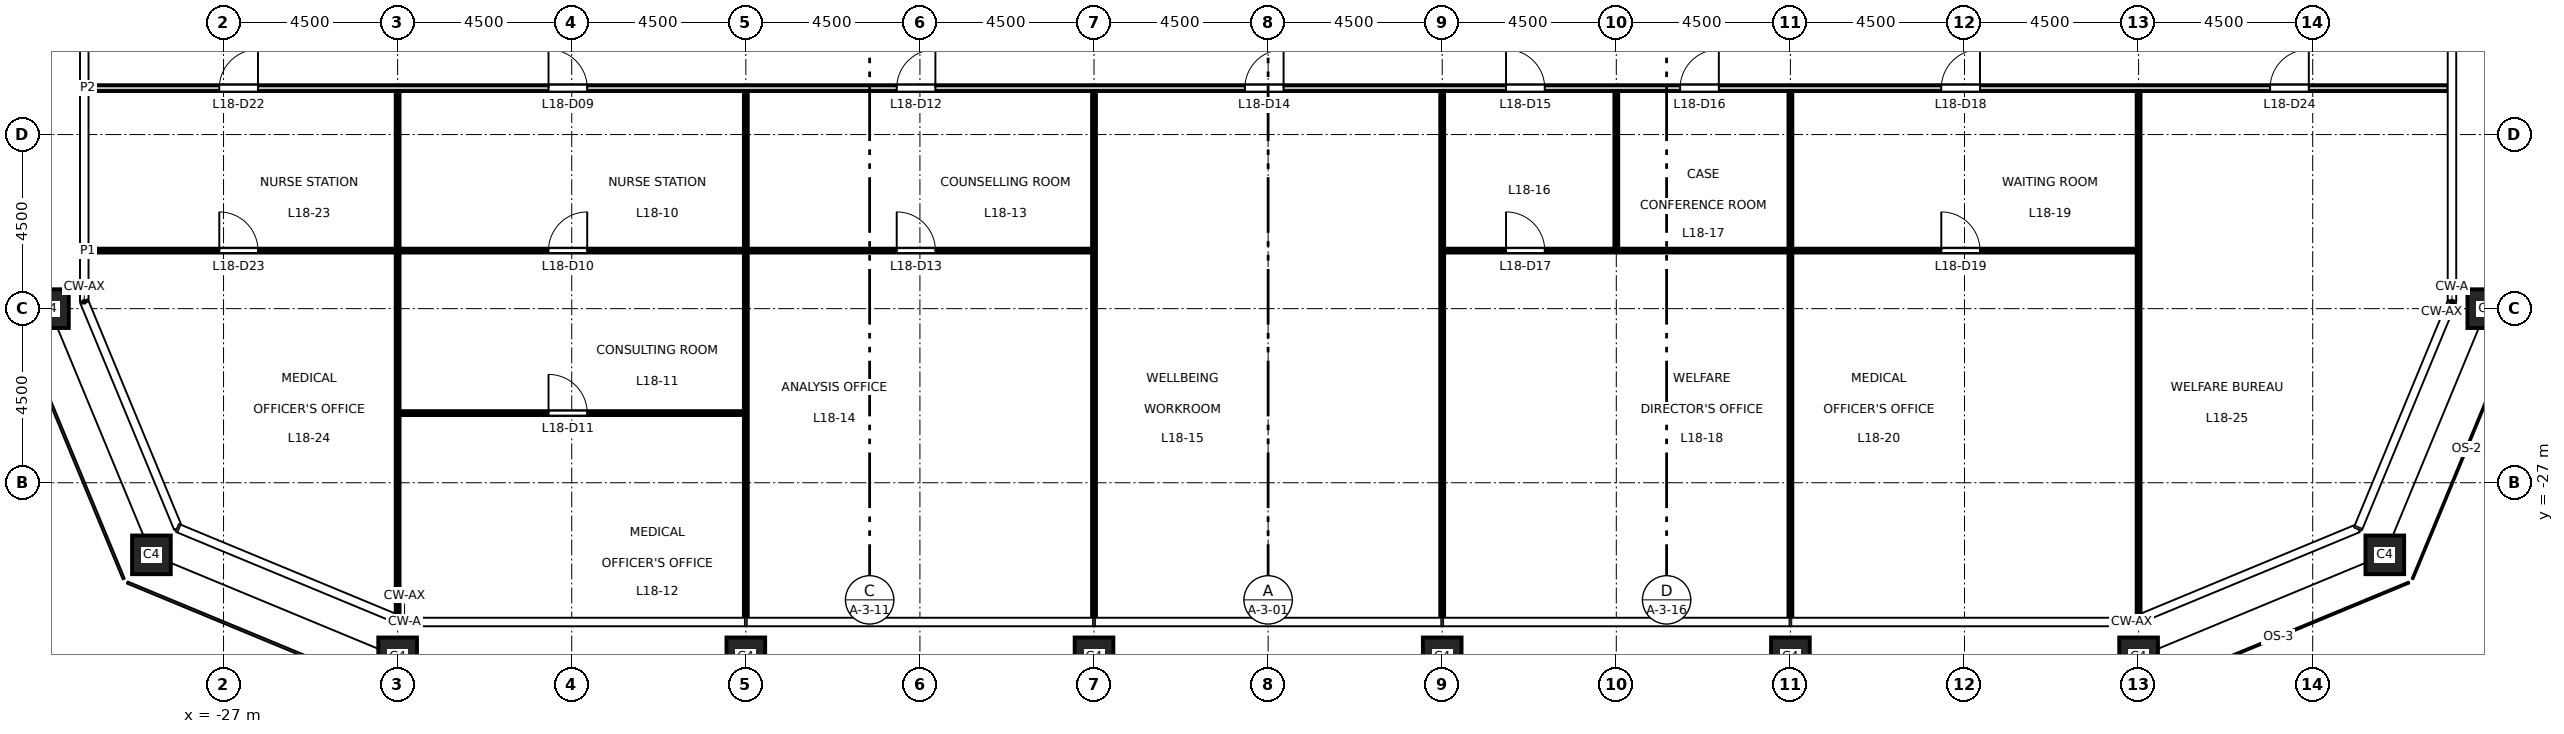
"""IFC4 building model, lengths in metres.
Left out: names, types, materials, properties, quantities, classifications, styles, units other than length and angle.
Written with IfcOpenShell. Run it as: python <this file> out.ifc"""

import sys

from ifc_helpers import new_model, si_unit, direction, frame, frame_2d, origin, origin_2d, place, context, subcontext, project, spatial, rectangle, hollow_rectangle, extrude, element, fill, save


model = new_model("IFC4")
c1 = context("Model", 3, precision=1e-05, world=origin(), true_north=direction((0.0, 1.0)))
c2 = subcontext(c1, "Body", "Model", "MODEL_VIEW")
j1 = project(units=[si_unit("LENGTHUNIT", "METRE"), si_unit("PLANEANGLEUNIT", "RADIAN")], contexts=[c1])
p1 = place(None, origin())
s1 = spatial("IfcSite", under=j1, at=p1, CompositionType="ELEMENT")
p2 = place(p1, origin())
s2 = spatial("IfcBuilding", under=s1, at=p2, CompositionType="ELEMENT")
p3 = place(p2, frame((0.0, 0.0, 85.2)))
s3 = spatial("IfcBuildingStorey", under=s2, at=p3, CompositionType="ELEMENT", Elevation=85.2)
for number, where, z_axis, x_axis in (
    (1, (-22.5, -31.5, 0.0), (0.0, 0.0, 1.0), (1.0, 0.0, 0.0)),
    (2, (-13.5, -31.5, 0.0), (0.0, 0.0, 1.0), (1.0, 0.0, 0.0)),
    (3, (-4.5, -31.5, 0.0), (0.0, 0.0, 1.0), (1.0, 0.0, 0.0)),
    (4, (4.5, -31.5, 0.0), (0.0, 0.0, 1.0), (1.0, 0.0, 0.0)),
    (5, (13.5, -31.5, 0.0), (0.0, 0.0, 1.0), (1.0, 0.0, 0.0)),
    (6, (22.5, -31.5, 0.0), (0.0, 0.0, 1.0), (1.0, 0.0, 0.0)),
    (7, (28.864, -28.864, 0.0), (0.0, 0.0, 1.0), (1.0, 0.0, 0.0)),
    (8, (31.5, -22.5, 0.0), (0.0, 0.0, 1.0), (1.0, 0.0, 0.0)),
    (9, (-31.5, -22.5, 0.0), (0.0, 0.0, 1.0), (1.0, 0.0, 0.0)),
    (10, (-28.864, -28.864, 0.0), (0.0, 0.0, 1.0), (1.0, 0.0, 0.0)),
):
    element("IfcColumn", number, at=place(p3, frame(where, z_axis=z_axis, x_axis=x_axis)), inside=s3, PredefinedType="COLUMN", context=c2, shape_type="SweptSolid", body=[
        extrude(hollow_rectangle(XDim=1.0, YDim=1.0, WallThickness=0.06, at=origin_2d()), origin(), (0.0, 0.0, 1.0), 4.5),
    ])
p4 = place(p3, frame((-22.45, -25.2, 0.0), z_axis=(0.0, 0.0, 1.0), x_axis=(1.0, 0.0, 0.0)))
e11 = element("IfcWall", 11, at=p4, inside=s3, PredefinedType="PARTITIONING", context=c2, shape_type="SweptSolid", body=[
    extrude(rectangle(XDim=8.9, YDim=0.1, at=frame_2d((4.45, 0.0))), origin(), (0.0, 0.0, 1.0), 4.35),
])
p5 = place(p4, frame((3.85, 0.0, 0.0)))
e12 = element("IfcOpeningElement", 12, at=p5, cuts=e11, PredefinedType="OPENING", context=c2, shape_type="SweptSolid", body=[
    extrude(rectangle(XDim=1.0, YDim=2.1, at=frame_2d((0.5, 1.05))), frame((0.0, 0.06, 0.0), z_axis=(0.0, -1.0, 0.0), x_axis=(1.0, 0.0, 0.0)), (0.0, 0.0, 1.0), 0.12),
])
p6 = place(p3, frame((-30.51, -21.0, 0.0), z_axis=(0.0, 0.0, 1.0), x_axis=(1.0, 0.0, 0.0)))
e13 = element("IfcWall", 13, at=p6, inside=s3, PredefinedType="PARTITIONING", context=c2, shape_type="SweptSolid", body=[
    extrude(rectangle(XDim=25.96, YDim=0.1, at=frame_2d((12.98, 0.0))), origin(), (0.0, 0.0, 1.0), 4.35),
])
p7 = place(p6, frame((11.91, 0.0, 0.0)))
e14 = element("IfcOpeningElement", 14, at=p7, cuts=e13, PredefinedType="OPENING", context=c2, shape_type="SweptSolid", body=[
    extrude(rectangle(XDim=1.0, YDim=2.1, at=frame_2d((0.5, 1.05))), frame((0.0, 0.06, 0.0), z_axis=(0.0, -1.0, 0.0), x_axis=(1.0, 0.0, 0.0)), (0.0, 0.0, 1.0), 0.12),
])
p8 = place(p6, frame((20.91, 0.0, 0.0)))
e15 = element("IfcOpeningElement", 15, at=p8, cuts=e13, PredefinedType="OPENING", context=c2, shape_type="SweptSolid", body=[
    extrude(rectangle(XDim=1.0, YDim=2.1, at=frame_2d((0.5, 1.05))), frame((0.0, 0.06, 0.0), z_axis=(0.0, -1.0, 0.0), x_axis=(1.0, 0.0, 0.0)), (0.0, 0.0, 1.0), 0.12),
])
p9 = place(p6, frame((3.4, 0.0, 0.0)))
e16 = element("IfcOpeningElement", 16, at=p9, cuts=e13, PredefinedType="OPENING", context=c2, shape_type="SweptSolid", body=[
    extrude(rectangle(XDim=1.0, YDim=2.1, at=frame_2d((0.5, 1.05))), frame((0.0, 0.06, 0.0), z_axis=(0.0, -1.0, 0.0), x_axis=(1.0, 0.0, 0.0)), (0.0, 0.0, 1.0), 0.12),
])
p10 = place(p3, frame((4.55, -21.0, 0.0), z_axis=(0.0, 0.0, 1.0), x_axis=(1.0, 0.0, 0.0)))
e17 = element("IfcWall", 17, at=p10, inside=s3, PredefinedType="PARTITIONING", context=c2, shape_type="SweptSolid", body=[
    extrude(rectangle(XDim=17.9, YDim=0.1, at=frame_2d((8.95, 0.0))), origin(), (0.0, 0.0, 1.0), 4.35),
])
p11 = place(p10, frame((1.6, 0.0, 0.0)))
e18 = element("IfcOpeningElement", 18, at=p11, cuts=e17, PredefinedType="OPENING", context=c2, shape_type="SweptSolid", body=[
    extrude(rectangle(XDim=1.0, YDim=2.1, at=frame_2d((0.5, 1.05))), frame((0.0, 0.06, 0.0), z_axis=(0.0, -1.0, 0.0), x_axis=(1.0, 0.0, 0.0)), (0.0, 0.0, 1.0), 0.12),
])
p12 = place(p10, frame((12.85, 0.0, 0.0)))
e19 = element("IfcOpeningElement", 19, at=p12, cuts=e17, PredefinedType="OPENING", context=c2, shape_type="SweptSolid", body=[
    extrude(rectangle(XDim=1.0, YDim=2.1, at=frame_2d((0.5, 1.05))), frame((0.0, 0.06, 0.0), z_axis=(0.0, -1.0, 0.0), x_axis=(1.0, 0.0, 0.0)), (0.0, 0.0, 1.0), 0.12),
])
p13 = place(p3, frame((-30.51, -16.8, 0.0), z_axis=(0.0, 0.0, 1.0), x_axis=(1.0, 0.0, 0.0)))
e20 = element("IfcWall", 20, at=p13, inside=s3, PredefinedType="PARTITIONING", context=c2, shape_type="SweptSolid", body=[
    extrude(rectangle(XDim=61.02, YDim=0.15, at=frame_2d((30.51, 0.0))), origin(), (0.0, 0.0, 1.0), 4.35),
])
p14 = place(p13, frame((11.91, 0.0, 0.0)))
e21 = element("IfcOpeningElement", 21, at=p14, cuts=e20, PredefinedType="OPENING", context=c2, shape_type="SweptSolid", body=[
    extrude(rectangle(XDim=1.0, YDim=2.1, at=frame_2d((0.5, 1.05))), frame((0.0, 0.085, 0.0), z_axis=(0.0, -1.0, 0.0), x_axis=(1.0, 0.0, 0.0)), (0.0, 0.0, 1.0), 0.17),
])
p15 = place(p13, frame((20.91, 0.0, 0.0)))
e22 = element("IfcOpeningElement", 22, at=p15, cuts=e20, PredefinedType="OPENING", context=c2, shape_type="SweptSolid", body=[
    extrude(rectangle(XDim=1.0, YDim=2.1, at=frame_2d((0.5, 1.05))), frame((0.0, 0.085, 0.0), z_axis=(0.0, -1.0, 0.0), x_axis=(1.0, 0.0, 0.0)), (0.0, 0.0, 1.0), 0.17),
])
p16 = place(p13, frame((29.91, 0.0, 0.0)))
e23 = element("IfcOpeningElement", 23, at=p16, cuts=e20, PredefinedType="OPENING", context=c2, shape_type="SweptSolid", body=[
    extrude(rectangle(XDim=1.0, YDim=2.1, at=frame_2d((0.5, 1.05))), frame((0.0, 0.085, 0.0), z_axis=(0.0, -1.0, 0.0), x_axis=(1.0, 0.0, 0.0)), (0.0, 0.0, 1.0), 0.17),
])
p17 = place(p13, frame((36.66, 0.0, 0.0)))
e24 = element("IfcOpeningElement", 24, at=p17, cuts=e20, PredefinedType="OPENING", context=c2, shape_type="SweptSolid", body=[
    extrude(rectangle(XDim=1.0, YDim=2.1, at=frame_2d((0.5, 1.05))), frame((0.0, 0.085, 0.0), z_axis=(0.0, -1.0, 0.0), x_axis=(1.0, 0.0, 0.0)), (0.0, 0.0, 1.0), 0.17),
])
p18 = place(p13, frame((41.16, 0.0, 0.0)))
e25 = element("IfcOpeningElement", 25, at=p18, cuts=e20, PredefinedType="OPENING", context=c2, shape_type="SweptSolid", body=[
    extrude(rectangle(XDim=1.0, YDim=2.1, at=frame_2d((0.5, 1.05))), frame((0.0, 0.085, 0.0), z_axis=(0.0, -1.0, 0.0), x_axis=(1.0, 0.0, 0.0)), (0.0, 0.0, 1.0), 0.17),
])
p19 = place(p13, frame((47.91, 0.0, 0.0)))
e26 = element("IfcOpeningElement", 26, at=p19, cuts=e20, PredefinedType="OPENING", context=c2, shape_type="SweptSolid", body=[
    extrude(rectangle(XDim=1.0, YDim=2.1, at=frame_2d((0.5, 1.05))), frame((0.0, 0.085, 0.0), z_axis=(0.0, -1.0, 0.0), x_axis=(1.0, 0.0, 0.0)), (0.0, 0.0, 1.0), 0.17),
])
p20 = place(p13, frame((3.4, 0.0, 0.0)))
e27 = element("IfcOpeningElement", 27, at=p20, cuts=e20, PredefinedType="OPENING", context=c2, shape_type="SweptSolid", body=[
    extrude(rectangle(XDim=1.0, YDim=2.1, at=frame_2d((0.5, 1.05))), frame((0.0, 0.085, 0.0), z_axis=(0.0, -1.0, 0.0), x_axis=(1.0, 0.0, 0.0)), (0.0, 0.0, 1.0), 0.17),
])
p21 = place(p13, frame((56.41, 0.0, 0.0)))
e28 = element("IfcOpeningElement", 28, at=p21, cuts=e20, PredefinedType="OPENING", context=c2, shape_type="SweptSolid", body=[
    extrude(rectangle(XDim=1.0, YDim=2.1, at=frame_2d((0.5, 1.05))), frame((0.0, 0.085, 0.0), z_axis=(0.0, -1.0, 0.0), x_axis=(1.0, 0.0, 0.0)), (0.0, 0.0, 1.0), 0.17),
])
p22 = place(p3, frame((-22.5, -30.428, 0.0), z_axis=(0.0, 0.0, 1.0), x_axis=(0.0, 1.0, 0.0)))
e29 = element("IfcWall", 29, at=p22, inside=s3, PredefinedType="PARTITIONING", context=c2, shape_type="SweptSolid", body=[
    extrude(rectangle(XDim=9.378, YDim=0.1, at=frame_2d((4.689, 0.0))), origin(), (0.0, 0.0, 1.0), 3.35),
])
p23 = place(p3, frame((-22.5, -20.95, 0.0), z_axis=(0.0, 0.0, 1.0), x_axis=(0.0, 1.0, 0.0)))
e30 = element("IfcWall", 30, at=p23, inside=s3, PredefinedType="PARTITIONING", context=c2, shape_type="SweptSolid", body=[
    extrude(rectangle(XDim=4.075, YDim=0.1, at=frame_2d((2.038, 0.0))), origin(), (0.0, 0.0, 1.0), 3.35),
])
p24 = place(p3, frame((-13.5, -30.51, 0.0), z_axis=(0.0, 0.0, 1.0), x_axis=(0.0, 1.0, 0.0)))
e31 = element("IfcWall", 31, at=p24, inside=s3, PredefinedType="PARTITIONING", context=c2, shape_type="SweptSolid", body=[
    extrude(rectangle(XDim=9.46, YDim=0.1, at=frame_2d((4.73, 0.0))), origin(), (0.0, 0.0, 1.0), 3.35),
])
p25 = place(p3, frame((-13.5, -20.95, 0.0), z_axis=(0.0, 0.0, 1.0), x_axis=(0.0, 1.0, 0.0)))
e32 = element("IfcWall", 32, at=p25, inside=s3, PredefinedType="PARTITIONING", context=c2, shape_type="SweptSolid", body=[
    extrude(rectangle(XDim=4.075, YDim=0.1, at=frame_2d((2.038, 0.0))), origin(), (0.0, 0.0, 1.0), 3.35),
])
for number, where, z_axis, x_axis in (
    (33, (-4.5, -30.51, 0.0), (0.0, 0.0, 1.0), (0.0, 1.0, 0.0)),
    (34, (4.5, -30.51, 0.0), (0.0, 0.0, 1.0), (0.0, 1.0, 0.0)),
):
    element("IfcWall", number, at=place(p3, frame(where, z_axis=z_axis, x_axis=x_axis)), inside=s3, PredefinedType="PARTITIONING", context=c2, shape_type="SweptSolid", body=[
        extrude(rectangle(XDim=13.635, YDim=0.1, at=frame_2d((6.817, 0.0))), origin(), (0.0, 0.0, 1.0), 3.35),
    ])
p26 = place(p3, frame((9.0, -20.95, 0.0), z_axis=(0.0, 0.0, 1.0), x_axis=(0.0, 1.0, 0.0)))
e35 = element("IfcWall", 35, at=p26, inside=s3, PredefinedType="PARTITIONING", context=c2, shape_type="SweptSolid", body=[
    extrude(rectangle(XDim=4.075, YDim=0.1, at=frame_2d((2.038, 0.0))), origin(), (0.0, 0.0, 1.0), 4.35),
])
p27 = place(p3, frame((13.5, -30.51, 0.0), z_axis=(0.0, 0.0, 1.0), x_axis=(0.0, 1.0, 0.0)))
e36 = element("IfcWall", 36, at=p27, inside=s3, PredefinedType="PARTITIONING", context=c2, shape_type="SweptSolid", body=[
    extrude(rectangle(XDim=9.46, YDim=0.1, at=frame_2d((4.73, 0.0))), origin(), (0.0, 0.0, 1.0), 3.35),
])
p28 = place(p3, frame((13.5, -20.95, 0.0), z_axis=(0.0, 0.0, 1.0), x_axis=(0.0, 1.0, 0.0)))
e37 = element("IfcWall", 37, at=p28, inside=s3, PredefinedType="PARTITIONING", context=c2, shape_type="SweptSolid", body=[
    extrude(rectangle(XDim=4.075, YDim=0.1, at=frame_2d((2.038, 0.0))), origin(), (0.0, 0.0, 1.0), 3.35),
])
p29 = place(p3, frame((22.5, -30.428, 0.0), z_axis=(0.0, 0.0, 1.0), x_axis=(0.0, 1.0, 0.0)))
e38 = element("IfcWall", 38, at=p29, inside=s3, PredefinedType="PARTITIONING", context=c2, shape_type="SweptSolid", body=[
    extrude(rectangle(XDim=13.553, YDim=0.1, at=frame_2d((6.776, 0.0))), origin(), (0.0, 0.0, 1.0), 3.35),
])
p30 = place(p14, origin())
e39 = element("IfcDoor", 39, at=p30, inside=s3, OperationType="SINGLE_SWING_LEFT", PredefinedType="DOOR", context=c2, shape_type="SweptSolid", body=[
    extrude(rectangle(XDim=1.0, YDim=2.1, at=frame_2d((0.5, 1.05))), frame((0.0, 0.025, 0.0), z_axis=(0.0, -1.0, 0.0), x_axis=(1.0, 0.0, 0.0)), (0.0, 0.0, 1.0), 0.05),
])
fill(e21, e39)
p31 = place(p7, origin())
e40 = element("IfcDoor", 40, at=p31, inside=s3, OperationType="SINGLE_SWING_RIGHT", PredefinedType="DOOR", context=c2, shape_type="SweptSolid", body=[
    extrude(rectangle(XDim=1.0, YDim=2.1, at=frame_2d((0.5, 1.05))), frame((0.0, 0.025, 0.0), z_axis=(0.0, -1.0, 0.0), x_axis=(1.0, 0.0, 0.0)), (0.0, 0.0, 1.0), 0.05),
])
fill(e14, e40)
p32 = place(p5, origin())
e41 = element("IfcDoor", 41, at=p32, inside=s3, OperationType="SINGLE_SWING_LEFT", PredefinedType="DOOR", context=c2, shape_type="SweptSolid", body=[
    extrude(rectangle(XDim=1.0, YDim=2.1, at=frame_2d((0.5, 1.05))), frame((0.0, 0.025, 0.0), z_axis=(0.0, -1.0, 0.0), x_axis=(1.0, 0.0, 0.0)), (0.0, 0.0, 1.0), 0.05),
])
fill(e12, e41)
p33 = place(p15, origin())
e42 = element("IfcDoor", 42, at=p33, inside=s3, OperationType="SINGLE_SWING_RIGHT", PredefinedType="DOOR", context=c2, shape_type="SweptSolid", body=[
    extrude(rectangle(XDim=1.0, YDim=2.1, at=frame_2d((0.5, 1.05))), frame((0.0, 0.025, 0.0), z_axis=(0.0, -1.0, 0.0), x_axis=(1.0, 0.0, 0.0)), (0.0, 0.0, 1.0), 0.05),
])
fill(e22, e42)
p34 = place(p8, origin())
e43 = element("IfcDoor", 43, at=p34, inside=s3, OperationType="SINGLE_SWING_LEFT", PredefinedType="DOOR", context=c2, shape_type="SweptSolid", body=[
    extrude(rectangle(XDim=1.0, YDim=2.1, at=frame_2d((0.5, 1.05))), frame((0.0, 0.025, 0.0), z_axis=(0.0, -1.0, 0.0), x_axis=(1.0, 0.0, 0.0)), (0.0, 0.0, 1.0), 0.05),
])
fill(e15, e43)
p35 = place(p16, origin())
e44 = element("IfcDoor", 44, at=p35, inside=s3, OperationType="SINGLE_SWING_RIGHT", PredefinedType="DOOR", context=c2, shape_type="SweptSolid", body=[
    extrude(rectangle(XDim=1.0, YDim=2.1, at=frame_2d((0.5, 1.05))), frame((0.0, 0.025, 0.0), z_axis=(0.0, -1.0, 0.0), x_axis=(1.0, 0.0, 0.0)), (0.0, 0.0, 1.0), 0.05),
])
fill(e23, e44)
p36 = place(p17, origin())
e45 = element("IfcDoor", 45, at=p36, inside=s3, OperationType="SINGLE_SWING_LEFT", PredefinedType="DOOR", context=c2, shape_type="SweptSolid", body=[
    extrude(rectangle(XDim=1.0, YDim=2.1, at=frame_2d((0.5, 1.05))), frame((0.0, 0.025, 0.0), z_axis=(0.0, -1.0, 0.0), x_axis=(1.0, 0.0, 0.0)), (0.0, 0.0, 1.0), 0.05),
])
fill(e24, e45)
p37 = place(p18, origin())
e46 = element("IfcDoor", 46, at=p37, inside=s3, OperationType="SINGLE_SWING_RIGHT", PredefinedType="DOOR", context=c2, shape_type="SweptSolid", body=[
    extrude(rectangle(XDim=1.0, YDim=2.1, at=frame_2d((0.5, 1.05))), frame((0.0, 0.025, 0.0), z_axis=(0.0, -1.0, 0.0), x_axis=(1.0, 0.0, 0.0)), (0.0, 0.0, 1.0), 0.05),
])
fill(e25, e46)
p38 = place(p11, origin())
e47 = element("IfcDoor", 47, at=p38, inside=s3, OperationType="SINGLE_SWING_LEFT", PredefinedType="DOOR", context=c2, shape_type="SweptSolid", body=[
    extrude(rectangle(XDim=1.0, YDim=2.1, at=frame_2d((0.5, 1.05))), frame((0.0, 0.025, 0.0), z_axis=(0.0, -1.0, 0.0), x_axis=(1.0, 0.0, 0.0)), (0.0, 0.0, 1.0), 0.05),
])
fill(e18, e47)
p39 = place(p19, origin())
e48 = element("IfcDoor", 48, at=p39, inside=s3, OperationType="SINGLE_SWING_RIGHT", PredefinedType="DOOR", context=c2, shape_type="SweptSolid", body=[
    extrude(rectangle(XDim=1.0, YDim=2.1, at=frame_2d((0.5, 1.05))), frame((0.0, 0.025, 0.0), z_axis=(0.0, -1.0, 0.0), x_axis=(1.0, 0.0, 0.0)), (0.0, 0.0, 1.0), 0.05),
])
fill(e26, e48)
p40 = place(p12, origin())
e49 = element("IfcDoor", 49, at=p40, inside=s3, OperationType="SINGLE_SWING_LEFT", PredefinedType="DOOR", context=c2, shape_type="SweptSolid", body=[
    extrude(rectangle(XDim=1.0, YDim=2.1, at=frame_2d((0.5, 1.05))), frame((0.0, 0.025, 0.0), z_axis=(0.0, -1.0, 0.0), x_axis=(1.0, 0.0, 0.0)), (0.0, 0.0, 1.0), 0.05),
])
fill(e19, e49)
p41 = place(p20, origin())
e50 = element("IfcDoor", 50, at=p41, inside=s3, OperationType="SINGLE_SWING_RIGHT", PredefinedType="DOOR", context=c2, shape_type="SweptSolid", body=[
    extrude(rectangle(XDim=1.0, YDim=2.1, at=frame_2d((0.5, 1.05))), frame((0.0, 0.025, 0.0), z_axis=(0.0, -1.0, 0.0), x_axis=(1.0, 0.0, 0.0)), (0.0, 0.0, 1.0), 0.05),
])
fill(e27, e50)
p42 = place(p9, origin())
e51 = element("IfcDoor", 51, at=p42, inside=s3, OperationType="SINGLE_SWING_LEFT", PredefinedType="DOOR", context=c2, shape_type="SweptSolid", body=[
    extrude(rectangle(XDim=1.0, YDim=2.1, at=frame_2d((0.5, 1.05))), frame((0.0, 0.025, 0.0), z_axis=(0.0, -1.0, 0.0), x_axis=(1.0, 0.0, 0.0)), (0.0, 0.0, 1.0), 0.05),
])
fill(e16, e51)
p43 = place(p21, origin())
e52 = element("IfcDoor", 52, at=p43, inside=s3, OperationType="SINGLE_SWING_RIGHT", PredefinedType="DOOR", context=c2, shape_type="SweptSolid", body=[
    extrude(rectangle(XDim=1.0, YDim=2.1, at=frame_2d((0.5, 1.05))), frame((0.0, 0.025, 0.0), z_axis=(0.0, -1.0, 0.0), x_axis=(1.0, 0.0, 0.0)), (0.0, 0.0, 1.0), 0.05),
])
fill(e28, e52)
save(model, sys.argv[1])
